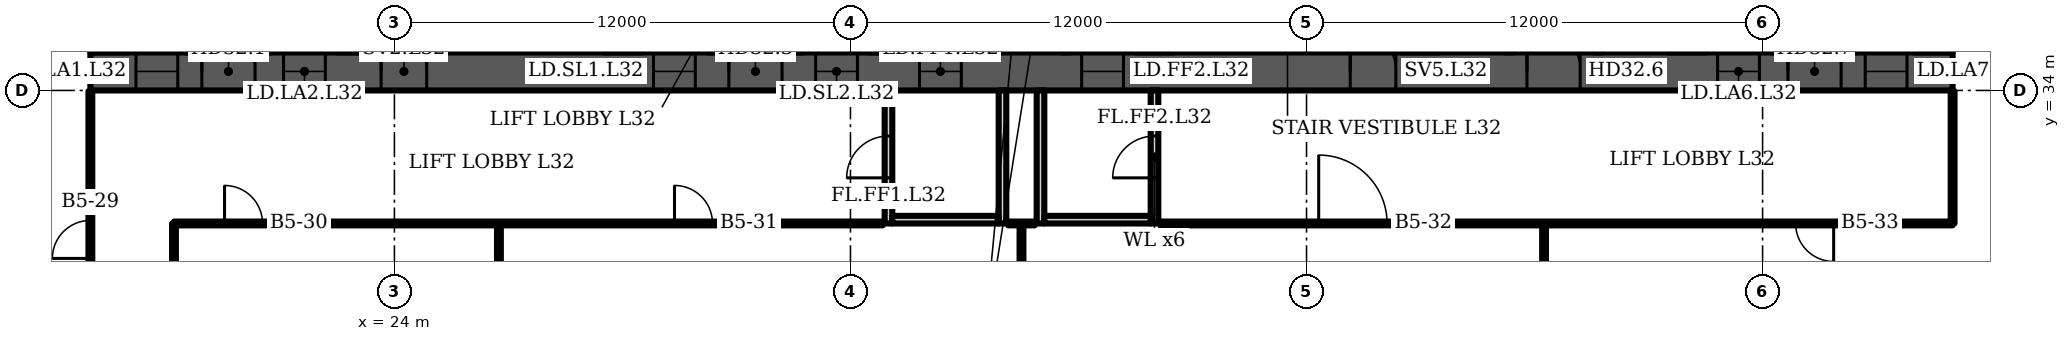
"""IFC4 building model, lengths in metres.
Left out: names, types, materials, properties, quantities, classifications, styles, units other than length and angle.
Written with IfcOpenShell. Run it as: python <this file> out.ifc"""

import sys

from ifc_helpers import new_model, si_unit, direction, frame, frame_2d, origin, place, context, subcontext, project, spatial, rectangle, extrude, element, fill, save


model = new_model("IFC4")
c1 = context("Model", 3, precision=1e-05, world=origin(), true_north=direction((0.0, 1.0)))
c2 = subcontext(c1, "Body", "Model", "MODEL_VIEW")
j1 = project(units=[si_unit("LENGTHUNIT", "METRE"), si_unit("PLANEANGLEUNIT", "RADIAN")], contexts=[c1])
p1 = place(None, origin())
s1 = spatial("IfcSite", under=j1, at=p1, CompositionType="ELEMENT")
p2 = place(p1, origin())
s2 = spatial("IfcBuilding", under=s1, at=p2, CompositionType="ELEMENT")
p3 = place(p2, frame((0.0, 0.0, 136.3)))
s3 = spatial("IfcBuildingStorey", under=s2, at=p3, CompositionType="ELEMENT", Elevation=136.3)
p4 = place(p3, frame((16.0, 34.5, 0.0), z_axis=(0.0, 0.0, 1.0), x_axis=(1.0, 0.0, 0.0)))
e1 = element("IfcWall", 1, at=p4, inside=s3, PredefinedType="SHEAR", context=c2, shape_type="SweptSolid", body=[
    extrude(rectangle(XDim=49.0, YDim=1.0, at=frame_2d((24.5, 0.0))), origin(), (0.0, 0.0, 1.0), 3.6),
])
p5 = place(p4, frame((1.2, 0.0, 0.0)))
e2 = element("IfcOpeningElement", 2, at=p5, cuts=e1, PredefinedType="OPENING", context=c2, shape_type="SweptSolid", body=[
    extrude(rectangle(XDim=1.1, YDim=2.1, at=frame_2d((0.55, 1.05))), frame((0.0, 0.51, 0.0), z_axis=(0.0, -1.0, 0.0), x_axis=(1.0, 0.0, 0.0)), (0.0, 0.0, 1.0), 1.02),
])
p6 = place(p4, frame((5.083, 0.0, 0.0)))
e3 = element("IfcOpeningElement", 3, at=p6, cuts=e1, PredefinedType="OPENING", context=c2, shape_type="SweptSolid", body=[
    extrude(rectangle(XDim=1.1, YDim=2.1, at=frame_2d((0.55, 1.05))), frame((0.0, 0.51, 0.0), z_axis=(0.0, -1.0, 0.0), x_axis=(1.0, 0.0, 0.0)), (0.0, 0.0, 1.0), 1.02),
])
p7 = place(p4, frame((2.933, 0.0, 0.0)))
e4 = element("IfcOpeningElement", 4, at=p7, cuts=e1, PredefinedType="OPENING", context=c2, shape_type="SweptSolid", body=[
    extrude(rectangle(XDim=1.4, YDim=2.1, at=frame_2d((0.7, 1.05))), frame((0.0, 0.51, 0.0), z_axis=(0.0, -1.0, 0.0), x_axis=(1.0, 0.0, 0.0)), (0.0, 0.0, 1.0), 1.02),
])
p8 = place(p4, frame((7.65, 0.0, 0.0)))
e5 = element("IfcOpeningElement", 5, at=p8, cuts=e1, PredefinedType="OPENING", context=c2, shape_type="SweptSolid", body=[
    extrude(rectangle(XDim=1.2, YDim=2.1, at=frame_2d((0.6, 1.05))), frame((0.0, 0.51, 0.0), z_axis=(0.0, -1.0, 0.0), x_axis=(1.0, 0.0, 0.0)), (0.0, 0.0, 1.0), 1.02),
])
p9 = place(p4, frame((14.817, 0.0, 0.0)))
e6 = element("IfcOpeningElement", 6, at=p9, cuts=e1, PredefinedType="OPENING", context=c2, shape_type="SweptSolid", body=[
    extrude(rectangle(XDim=1.1, YDim=2.1, at=frame_2d((0.55, 1.05))), frame((0.0, 0.51, 0.0), z_axis=(0.0, -1.0, 0.0), x_axis=(1.0, 0.0, 0.0)), (0.0, 0.0, 1.0), 1.02),
])
p10 = place(p4, frame((19.083, 0.0, 0.0)))
e7 = element("IfcOpeningElement", 7, at=p10, cuts=e1, PredefinedType="OPENING", context=c2, shape_type="SweptSolid", body=[
    extrude(rectangle(XDim=1.1, YDim=2.1, at=frame_2d((0.55, 1.05))), frame((0.0, 0.51, 0.0), z_axis=(0.0, -1.0, 0.0), x_axis=(1.0, 0.0, 0.0)), (0.0, 0.0, 1.0), 1.02),
])
p11 = place(p4, frame((16.8, 0.0, 0.0)))
e8 = element("IfcOpeningElement", 8, at=p11, cuts=e1, PredefinedType="OPENING", context=c2, shape_type="SweptSolid", body=[
    extrude(rectangle(XDim=1.4, YDim=2.1, at=frame_2d((0.7, 1.05))), frame((0.0, 0.51, 0.0), z_axis=(0.0, -1.0, 0.0), x_axis=(1.0, 0.0, 0.0)), (0.0, 0.0, 1.0), 1.02),
])
p12 = place(p4, frame((21.817, 0.0, 0.0)))
e9 = element("IfcOpeningElement", 9, at=p12, cuts=e1, PredefinedType="OPENING", context=c2, shape_type="SweptSolid", body=[
    extrude(rectangle(XDim=1.1, YDim=2.1, at=frame_2d((0.55, 1.05))), frame((0.0, 0.51, 0.0), z_axis=(0.0, -1.0, 0.0), x_axis=(1.0, 0.0, 0.0)), (0.0, 0.0, 1.0), 1.02),
])
p13 = place(p4, frame((26.083, 0.0, 0.0)))
e10 = element("IfcOpeningElement", 10, at=p13, cuts=e1, PredefinedType="OPENING", context=c2, shape_type="SweptSolid", body=[
    extrude(rectangle(XDim=1.1, YDim=2.1, at=frame_2d((0.55, 1.05))), frame((0.0, 0.51, 0.0), z_axis=(0.0, -1.0, 0.0), x_axis=(1.0, 0.0, 0.0)), (0.0, 0.0, 1.0), 1.02),
])
p14 = place(p4, frame((33.15, 0.0, 0.0)))
e11 = element("IfcOpeningElement", 11, at=p14, cuts=e1, PredefinedType="OPENING", context=c2, shape_type="SweptSolid", body=[
    extrude(rectangle(XDim=1.2, YDim=2.1, at=frame_2d((0.6, 1.05))), frame((0.0, 0.51, 0.0), z_axis=(0.0, -1.0, 0.0), x_axis=(1.0, 0.0, 0.0)), (0.0, 0.0, 1.0), 1.02),
])
p15 = place(p4, frame((37.8, 0.0, 0.0)))
e12 = element("IfcOpeningElement", 12, at=p15, cuts=e1, PredefinedType="OPENING", context=c2, shape_type="SweptSolid", body=[
    extrude(rectangle(XDim=1.4, YDim=2.1, at=frame_2d((0.7, 1.05))), frame((0.0, 0.51, 0.0), z_axis=(0.0, -1.0, 0.0), x_axis=(1.0, 0.0, 0.0)), (0.0, 0.0, 1.0), 1.02),
])
p16 = place(p4, frame((42.817, 0.0, 0.0)))
e13 = element("IfcOpeningElement", 13, at=p16, cuts=e1, PredefinedType="OPENING", context=c2, shape_type="SweptSolid", body=[
    extrude(rectangle(XDim=1.1, YDim=2.1, at=frame_2d((0.55, 1.05))), frame((0.0, 0.51, 0.0), z_axis=(0.0, -1.0, 0.0), x_axis=(1.0, 0.0, 0.0)), (0.0, 0.0, 1.0), 1.02),
])
p17 = place(p4, frame((46.7, 0.0, 0.0)))
e14 = element("IfcOpeningElement", 14, at=p17, cuts=e1, PredefinedType="OPENING", context=c2, shape_type="SweptSolid", body=[
    extrude(rectangle(XDim=1.1, YDim=2.1, at=frame_2d((0.55, 1.05))), frame((0.0, 0.51, 0.0), z_axis=(0.0, -1.0, 0.0), x_axis=(1.0, 0.0, 0.0)), (0.0, 0.0, 1.0), 1.02),
])
p18 = place(p4, frame((44.667, 0.0, 0.0)))
e15 = element("IfcOpeningElement", 15, at=p18, cuts=e1, PredefinedType="OPENING", context=c2, shape_type="SweptSolid", body=[
    extrude(rectangle(XDim=1.4, YDim=2.1, at=frame_2d((0.7, 1.05))), frame((0.0, 0.51, 0.0), z_axis=(0.0, -1.0, 0.0), x_axis=(1.0, 0.0, 0.0)), (0.0, 0.0, 1.0), 1.02),
])
p19 = place(p3, frame((37.0, 30.5, 0.0), z_axis=(0.0, 0.0, 1.0), x_axis=(0.0, 1.0, 0.0)))
e16 = element("IfcWall", 16, at=p19, inside=s3, PredefinedType="PARTITIONING", context=c2, shape_type="SweptSolid", body=[
    extrude(rectangle(XDim=3.5, YDim=0.2, at=frame_2d((1.75, 0.0))), origin(), (0.0, 0.0, 1.0), 3.2),
])
p20 = place(p19, frame((1.2, 0.0, 0.0)))
e17 = element("IfcOpeningElement", 17, at=p20, cuts=e16, PredefinedType="OPENING", context=c2, shape_type="SweptSolid", body=[
    extrude(rectangle(XDim=1.1, YDim=2.1, at=frame_2d((0.55, 1.05))), frame((0.0, 0.11, 0.0), z_axis=(0.0, -1.0, 0.0), x_axis=(1.0, 0.0, 0.0)), (0.0, 0.0, 1.0), 0.22),
])
p21 = place(p3, frame((40.0, 30.5, 0.0), z_axis=(0.0, 0.0, 1.0), x_axis=(0.0, 1.0, 0.0)))
e18 = element("IfcWall", 18, at=p21, inside=s3, PredefinedType="PARTITIONING", context=c2, shape_type="SweptSolid", body=[
    extrude(rectangle(XDim=3.5, YDim=0.2, at=frame_2d((1.75, 0.0))), origin(), (0.0, 0.0, 1.0), 3.2),
])
p22 = place(p3, frame((37.1, 30.6, 0.0), z_axis=(0.0, 0.0, 1.0), x_axis=(1.0, 0.0, 0.0)))
e19 = element("IfcWall", 19, at=p22, inside=s3, PredefinedType="PARTITIONING", context=c2, shape_type="SweptSolid", body=[
    extrude(rectangle(XDim=2.8, YDim=0.2, at=frame_2d((1.4, 0.0))), origin(), (0.0, 0.0, 1.0), 3.2),
])
p23 = place(p3, frame((41.0, 30.5, 0.0), z_axis=(0.0, 0.0, 1.0), x_axis=(0.0, 1.0, 0.0)))
e20 = element("IfcWall", 20, at=p23, inside=s3, PredefinedType="PARTITIONING", context=c2, shape_type="SweptSolid", body=[
    extrude(rectangle(XDim=3.5, YDim=0.2, at=frame_2d((1.75, 0.0))), origin(), (0.0, 0.0, 1.0), 3.2),
])
p24 = place(p3, frame((44.0, 30.5, 0.0), z_axis=(0.0, 0.0, 1.0), x_axis=(0.0, 1.0, 0.0)))
e21 = element("IfcWall", 21, at=p24, inside=s3, PredefinedType="PARTITIONING", context=c2, shape_type="SweptSolid", body=[
    extrude(rectangle(XDim=3.5, YDim=0.2, at=frame_2d((1.75, 0.0))), origin(), (0.0, 0.0, 1.0), 3.2),
])
p25 = place(p24, frame((1.2, 0.0, 0.0)))
e22 = element("IfcOpeningElement", 22, at=p25, cuts=e21, PredefinedType="OPENING", context=c2, shape_type="SweptSolid", body=[
    extrude(rectangle(XDim=1.1, YDim=2.1, at=frame_2d((0.55, 1.05))), frame((0.0, 0.11, 0.0), z_axis=(0.0, -1.0, 0.0), x_axis=(1.0, 0.0, 0.0)), (0.0, 0.0, 1.0), 0.22),
])
p26 = place(p3, frame((41.1, 30.6, 0.0), z_axis=(0.0, 0.0, 1.0), x_axis=(1.0, 0.0, 0.0)))
e23 = element("IfcWall", 23, at=p26, inside=s3, PredefinedType="PARTITIONING", context=c2, shape_type="SweptSolid", body=[
    extrude(rectangle(XDim=2.8, YDim=0.2, at=frame_2d((1.4, 0.0))), origin(), (0.0, 0.0, 1.0), 3.2),
])
p27 = place(p3, frame((16.0, 26.25, 0.0), z_axis=(0.0, 0.0, 1.0), x_axis=(0.0, 1.0, 0.0)))
e24 = element("IfcWall", 24, at=p27, inside=s3, PredefinedType="PARTITIONING", context=c2, shape_type="SweptSolid", body=[
    extrude(rectangle(XDim=7.73, YDim=0.1, at=frame_2d((3.865, 0.0))), origin(), (0.0, 0.0, 1.0), 3.2),
])
p28 = place(p27, frame((3.33, 0.0, 0.0)))
e25 = element("IfcOpeningElement", 25, at=p28, cuts=e24, PredefinedType="OPENING", context=c2, shape_type="SweptSolid", body=[
    extrude(rectangle(XDim=1.0, YDim=2.1, at=frame_2d((0.5, 1.05))), frame((0.0, 0.06, 0.0), z_axis=(0.0, -1.0, 0.0), x_axis=(1.0, 0.0, 0.0)), (0.0, 0.0, 1.0), 0.12),
])
p29 = place(p3, frame((18.2, 23.8, 0.0), z_axis=(0.0, 0.0, 1.0), x_axis=(0.0, 1.0, 0.0)))
e26 = element("IfcWall", 26, at=p29, inside=s3, PredefinedType="PARTITIONING", context=c2, shape_type="SweptSolid", body=[
    extrude(rectangle(XDim=6.7, YDim=0.1, at=frame_2d((3.35, 0.0))), origin(), (0.0, 0.0, 1.0), 3.2),
])
p30 = place(p3, frame((18.2, 30.5, 0.0), z_axis=(0.0, 0.0, 1.0), x_axis=(1.0, 0.0, 0.0)))
e27 = element("IfcWall", 27, at=p30, inside=s3, PredefinedType="PARTITIONING", context=c2, shape_type="SweptSolid", body=[
    extrude(rectangle(XDim=18.65, YDim=0.1, at=frame_2d((9.325, 0.0))), origin(), (0.0, 0.0, 1.0), 3.2),
])
p31 = place(p30, frame((1.33, 0.0, 0.0)))
e28 = element("IfcOpeningElement", 28, at=p31, cuts=e27, PredefinedType="OPENING", context=c2, shape_type="SweptSolid", body=[
    extrude(rectangle(XDim=1.0, YDim=2.1, at=frame_2d((0.5, 1.05))), frame((0.0, 0.06, 0.0), z_axis=(0.0, -1.0, 0.0), x_axis=(1.0, 0.0, 0.0)), (0.0, 0.0, 1.0), 0.12),
])
p32 = place(p30, frame((13.17, 0.0, 0.0)))
e29 = element("IfcOpeningElement", 29, at=p32, cuts=e27, PredefinedType="OPENING", context=c2, shape_type="SweptSolid", body=[
    extrude(rectangle(XDim=1.0, YDim=2.1, at=frame_2d((0.5, 1.05))), frame((0.0, 0.06, 0.0), z_axis=(0.0, -1.0, 0.0), x_axis=(1.0, 0.0, 0.0)), (0.0, 0.0, 1.0), 0.12),
])
for number, where, z_axis, x_axis in (
    (30, (26.75, 20.715, 0.0), (0.0, 0.0, 1.0), (0.0, 1.0, 0.0)),
    (31, (40.5, 20.715, 0.0), (0.0, 0.0, 1.0), (0.0, 1.0, 0.0)),
    (32, (54.25, 20.715, 0.0), (0.0, 0.0, 1.0), (0.0, 1.0, 0.0)),
):
    element("IfcWall", number, at=place(p3, frame(where, z_axis=z_axis, x_axis=x_axis)), inside=s3, PredefinedType="PARTITIONING", context=c2, shape_type="SweptSolid", body=[
        extrude(rectangle(XDim=9.785, YDim=0.1, at=frame_2d((4.893, 0.0))), origin(), (0.0, 0.0, 1.0), 3.2),
    ])
p33 = place(p3, frame((65.0, 30.5, 0.0), z_axis=(0.0, 0.0, 1.0), x_axis=(0.0, 1.0, 0.0)))
e33 = element("IfcWall", 33, at=p33, inside=s3, PredefinedType="PARTITIONING", context=c2, shape_type="SweptSolid", body=[
    extrude(rectangle(XDim=3.48, YDim=0.1, at=frame_2d((1.74, 0.0))), origin(), (0.0, 0.0, 1.0), 3.2),
])
p34 = place(p3, frame((40.15, 30.5, 0.0), z_axis=(0.0, 0.0, 1.0), x_axis=(1.0, 0.0, 0.0)))
e34 = element("IfcWall", 34, at=p34, inside=s3, PredefinedType="PARTITIONING", context=c2, shape_type="SweptSolid", body=[
    extrude(rectangle(XDim=0.7, YDim=0.1, at=frame_2d((0.35, 0.0))), origin(), (0.0, 0.0, 1.0), 3.2),
])
p35 = place(p3, frame((44.15, 30.5, 0.0), z_axis=(0.0, 0.0, 1.0), x_axis=(1.0, 0.0, 0.0)))
e35 = element("IfcWall", 35, at=p35, inside=s3, PredefinedType="PARTITIONING", context=c2, shape_type="SweptSolid", body=[
    extrude(rectangle(XDim=20.85, YDim=0.1, at=frame_2d((10.425, 0.0))), origin(), (0.0, 0.0, 1.0), 3.2),
])
p36 = place(p35, frame((4.17, 0.0, 0.0)))
e36 = element("IfcOpeningElement", 36, at=p36, cuts=e35, PredefinedType="OPENING", context=c2, shape_type="SweptSolid", body=[
    extrude(rectangle(XDim=1.8, YDim=2.1, at=frame_2d((0.9, 1.05))), frame((0.0, 0.06, 0.0), z_axis=(0.0, -1.0, 0.0), x_axis=(1.0, 0.0, 0.0)), (0.0, 0.0, 1.0), 0.12),
])
p37 = place(p35, frame((16.72, 0.0, 0.0)))
e37 = element("IfcOpeningElement", 37, at=p37, cuts=e35, PredefinedType="OPENING", context=c2, shape_type="SweptSolid", body=[
    extrude(rectangle(XDim=1.0, YDim=2.1, at=frame_2d((0.5, 1.05))), frame((0.0, 0.06, 0.0), z_axis=(0.0, -1.0, 0.0), x_axis=(1.0, 0.0, 0.0)), (0.0, 0.0, 1.0), 0.12),
])
p38 = place(p5, origin())
e38 = element("IfcDoor", 38, at=p38, inside=s3, OperationType="DOUBLE_DOOR_SLIDING", PredefinedType="DOOR", context=c2, shape_type="SweptSolid", body=[
    extrude(rectangle(XDim=1.1, YDim=2.1, at=frame_2d((0.55, 1.05))), frame((0.0, 0.025, 0.0), z_axis=(0.0, -1.0, 0.0), x_axis=(1.0, 0.0, 0.0)), (0.0, 0.0, 1.0), 0.05),
])
fill(e2, e38)
p39 = place(p6, origin())
e39 = element("IfcDoor", 39, at=p39, inside=s3, OperationType="DOUBLE_DOOR_SLIDING", PredefinedType="DOOR", context=c2, shape_type="SweptSolid", body=[
    extrude(rectangle(XDim=1.1, YDim=2.1, at=frame_2d((0.55, 1.05))), frame((0.0, 0.025, 0.0), z_axis=(0.0, -1.0, 0.0), x_axis=(1.0, 0.0, 0.0)), (0.0, 0.0, 1.0), 0.05),
])
fill(e3, e39)
p40 = place(p7, origin())
e40 = element("IfcDoor", 40, at=p40, inside=s3, OperationType="DOUBLE_DOOR_SINGLE_SWING", PredefinedType="DOOR", context=c2, shape_type="SweptSolid", body=[
    extrude(rectangle(XDim=1.4, YDim=2.1, at=frame_2d((0.7, 1.05))), frame((0.0, 0.025, 0.0), z_axis=(0.0, -1.0, 0.0), x_axis=(1.0, 0.0, 0.0)), (0.0, 0.0, 1.0), 0.05),
])
fill(e4, e40)
p41 = place(p8, origin())
e41 = element("IfcDoor", 41, at=p41, inside=s3, OperationType="SINGLE_SWING_LEFT", PredefinedType="DOOR", context=c2, shape_type="SweptSolid", body=[
    extrude(rectangle(XDim=1.2, YDim=2.1, at=frame_2d((0.6, 1.05))), frame((0.0, 0.025, 0.0), z_axis=(0.0, -1.0, 0.0), x_axis=(1.0, 0.0, 0.0)), (0.0, 0.0, 1.0), 0.05),
])
fill(e5, e41)
p42 = place(p9, origin())
e42 = element("IfcDoor", 42, at=p42, inside=s3, OperationType="DOUBLE_DOOR_SLIDING", PredefinedType="DOOR", context=c2, shape_type="SweptSolid", body=[
    extrude(rectangle(XDim=1.1, YDim=2.1, at=frame_2d((0.55, 1.05))), frame((0.0, 0.025, 0.0), z_axis=(0.0, -1.0, 0.0), x_axis=(1.0, 0.0, 0.0)), (0.0, 0.0, 1.0), 0.05),
])
fill(e6, e42)
p43 = place(p10, origin())
e43 = element("IfcDoor", 43, at=p43, inside=s3, OperationType="DOUBLE_DOOR_SLIDING", PredefinedType="DOOR", context=c2, shape_type="SweptSolid", body=[
    extrude(rectangle(XDim=1.1, YDim=2.1, at=frame_2d((0.55, 1.05))), frame((0.0, 0.025, 0.0), z_axis=(0.0, -1.0, 0.0), x_axis=(1.0, 0.0, 0.0)), (0.0, 0.0, 1.0), 0.05),
])
fill(e7, e43)
p44 = place(p11, origin())
e44 = element("IfcDoor", 44, at=p44, inside=s3, OperationType="DOUBLE_DOOR_SINGLE_SWING", PredefinedType="DOOR", context=c2, shape_type="SweptSolid", body=[
    extrude(rectangle(XDim=1.4, YDim=2.1, at=frame_2d((0.7, 1.05))), frame((0.0, 0.025, 0.0), z_axis=(0.0, -1.0, 0.0), x_axis=(1.0, 0.0, 0.0)), (0.0, 0.0, 1.0), 0.05),
])
fill(e8, e44)
p45 = place(p12, origin())
e45 = element("IfcDoor", 45, at=p45, inside=s3, OperationType="DOUBLE_DOOR_SLIDING", PredefinedType="DOOR", context=c2, shape_type="SweptSolid", body=[
    extrude(rectangle(XDim=1.1, YDim=2.1, at=frame_2d((0.55, 1.05))), frame((0.0, 0.025, 0.0), z_axis=(0.0, -1.0, 0.0), x_axis=(1.0, 0.0, 0.0)), (0.0, 0.0, 1.0), 0.05),
])
fill(e9, e45)
p46 = place(p13, origin())
e46 = element("IfcDoor", 46, at=p46, inside=s3, OperationType="DOUBLE_DOOR_SLIDING", PredefinedType="DOOR", context=c2, shape_type="SweptSolid", body=[
    extrude(rectangle(XDim=1.1, YDim=2.1, at=frame_2d((0.55, 1.05))), frame((0.0, 0.025, 0.0), z_axis=(0.0, -1.0, 0.0), x_axis=(1.0, 0.0, 0.0)), (0.0, 0.0, 1.0), 0.05),
])
fill(e10, e46)
p47 = place(p14, origin())
e47 = element("IfcDoor", 47, at=p47, inside=s3, OperationType="SINGLE_SWING_LEFT", PredefinedType="DOOR", context=c2, shape_type="SweptSolid", body=[
    extrude(rectangle(XDim=1.2, YDim=2.1, at=frame_2d((0.6, 1.05))), frame((0.0, 0.025, 0.0), z_axis=(0.0, -1.0, 0.0), x_axis=(1.0, 0.0, 0.0)), (0.0, 0.0, 1.0), 0.05),
])
fill(e11, e47)
p48 = place(p15, origin())
e48 = element("IfcDoor", 48, at=p48, inside=s3, OperationType="DOUBLE_DOOR_SINGLE_SWING", PredefinedType="DOOR", context=c2, shape_type="SweptSolid", body=[
    extrude(rectangle(XDim=1.4, YDim=2.1, at=frame_2d((0.7, 1.05))), frame((0.0, 0.025, 0.0), z_axis=(0.0, -1.0, 0.0), x_axis=(1.0, 0.0, 0.0)), (0.0, 0.0, 1.0), 0.05),
])
fill(e12, e48)
p49 = place(p16, origin())
e49 = element("IfcDoor", 49, at=p49, inside=s3, OperationType="DOUBLE_DOOR_SLIDING", PredefinedType="DOOR", context=c2, shape_type="SweptSolid", body=[
    extrude(rectangle(XDim=1.1, YDim=2.1, at=frame_2d((0.55, 1.05))), frame((0.0, 0.025, 0.0), z_axis=(0.0, -1.0, 0.0), x_axis=(1.0, 0.0, 0.0)), (0.0, 0.0, 1.0), 0.05),
])
fill(e13, e49)
p50 = place(p17, origin())
e50 = element("IfcDoor", 50, at=p50, inside=s3, OperationType="DOUBLE_DOOR_SLIDING", PredefinedType="DOOR", context=c2, shape_type="SweptSolid", body=[
    extrude(rectangle(XDim=1.1, YDim=2.1, at=frame_2d((0.55, 1.05))), frame((0.0, 0.025, 0.0), z_axis=(0.0, -1.0, 0.0), x_axis=(1.0, 0.0, 0.0)), (0.0, 0.0, 1.0), 0.05),
])
fill(e14, e50)
p51 = place(p18, origin())
e51 = element("IfcDoor", 51, at=p51, inside=s3, OperationType="DOUBLE_DOOR_SINGLE_SWING", PredefinedType="DOOR", context=c2, shape_type="SweptSolid", body=[
    extrude(rectangle(XDim=1.4, YDim=2.1, at=frame_2d((0.7, 1.05))), frame((0.0, 0.025, 0.0), z_axis=(0.0, -1.0, 0.0), x_axis=(1.0, 0.0, 0.0)), (0.0, 0.0, 1.0), 0.05),
])
fill(e15, e51)
p52 = place(p20, origin())
e52 = element("IfcDoor", 52, at=p52, inside=s3, OperationType="SINGLE_SWING_LEFT", PredefinedType="DOOR", context=c2, shape_type="SweptSolid", body=[
    extrude(rectangle(XDim=1.1, YDim=2.1, at=frame_2d((0.55, 1.05))), frame((0.0, 0.025, 0.0), z_axis=(0.0, -1.0, 0.0), x_axis=(1.0, 0.0, 0.0)), (0.0, 0.0, 1.0), 0.05),
])
fill(e17, e52)
p53 = place(p25, origin())
e53 = element("IfcDoor", 53, at=p53, inside=s3, OperationType="SINGLE_SWING_LEFT", PredefinedType="DOOR", context=c2, shape_type="SweptSolid", body=[
    extrude(rectangle(XDim=1.1, YDim=2.1, at=frame_2d((0.55, 1.05))), frame((0.0, 0.025, 0.0), z_axis=(0.0, -1.0, 0.0), x_axis=(1.0, 0.0, 0.0)), (0.0, 0.0, 1.0), 0.05),
])
fill(e22, e53)
p54 = place(p28, origin())
e54 = element("IfcDoor", 54, at=p54, inside=s3, OperationType="SINGLE_SWING_LEFT", PredefinedType="DOOR", context=c2, shape_type="SweptSolid", body=[
    extrude(rectangle(XDim=1.0, YDim=2.1, at=frame_2d((0.5, 1.05))), frame((0.0, 0.025, 0.0), z_axis=(0.0, -1.0, 0.0), x_axis=(1.0, 0.0, 0.0)), (0.0, 0.0, 1.0), 0.05),
])
fill(e25, e54)
p55 = place(p31, origin())
e55 = element("IfcDoor", 55, at=p55, inside=s3, OperationType="SINGLE_SWING_LEFT", PredefinedType="DOOR", context=c2, shape_type="SweptSolid", body=[
    extrude(rectangle(XDim=1.0, YDim=2.1, at=frame_2d((0.5, 1.05))), frame((0.0, 0.025, 0.0), z_axis=(0.0, -1.0, 0.0), x_axis=(1.0, 0.0, 0.0)), (0.0, 0.0, 1.0), 0.05),
])
fill(e28, e55)
p56 = place(p32, origin())
e56 = element("IfcDoor", 56, at=p56, inside=s3, OperationType="SINGLE_SWING_LEFT", PredefinedType="DOOR", context=c2, shape_type="SweptSolid", body=[
    extrude(rectangle(XDim=1.0, YDim=2.1, at=frame_2d((0.5, 1.05))), frame((0.0, 0.025, 0.0), z_axis=(0.0, -1.0, 0.0), x_axis=(1.0, 0.0, 0.0)), (0.0, 0.0, 1.0), 0.05),
])
fill(e29, e56)
p57 = place(p36, origin())
e57 = element("IfcDoor", 57, at=p57, inside=s3, OperationType="DOUBLE_DOOR_SINGLE_SWING", PredefinedType="DOOR", context=c2, shape_type="SweptSolid", body=[
    extrude(rectangle(XDim=1.8, YDim=2.1, at=frame_2d((0.9, 1.05))), frame((0.0, 0.025, 0.0), z_axis=(0.0, -1.0, 0.0), x_axis=(1.0, 0.0, 0.0)), (0.0, 0.0, 1.0), 0.05),
])
fill(e36, e57)
p58 = place(p37, origin())
e58 = element("IfcDoor", 58, at=p58, inside=s3, OperationType="SINGLE_SWING_RIGHT", PredefinedType="DOOR", context=c2, shape_type="SweptSolid", body=[
    extrude(rectangle(XDim=1.0, YDim=2.1, at=frame_2d((0.5, 1.05))), frame((0.0, 0.025, 0.0), z_axis=(0.0, -1.0, 0.0), x_axis=(1.0, 0.0, 0.0)), (0.0, 0.0, 1.0), 0.05),
])
fill(e37, e58)
save(model, sys.argv[1])
